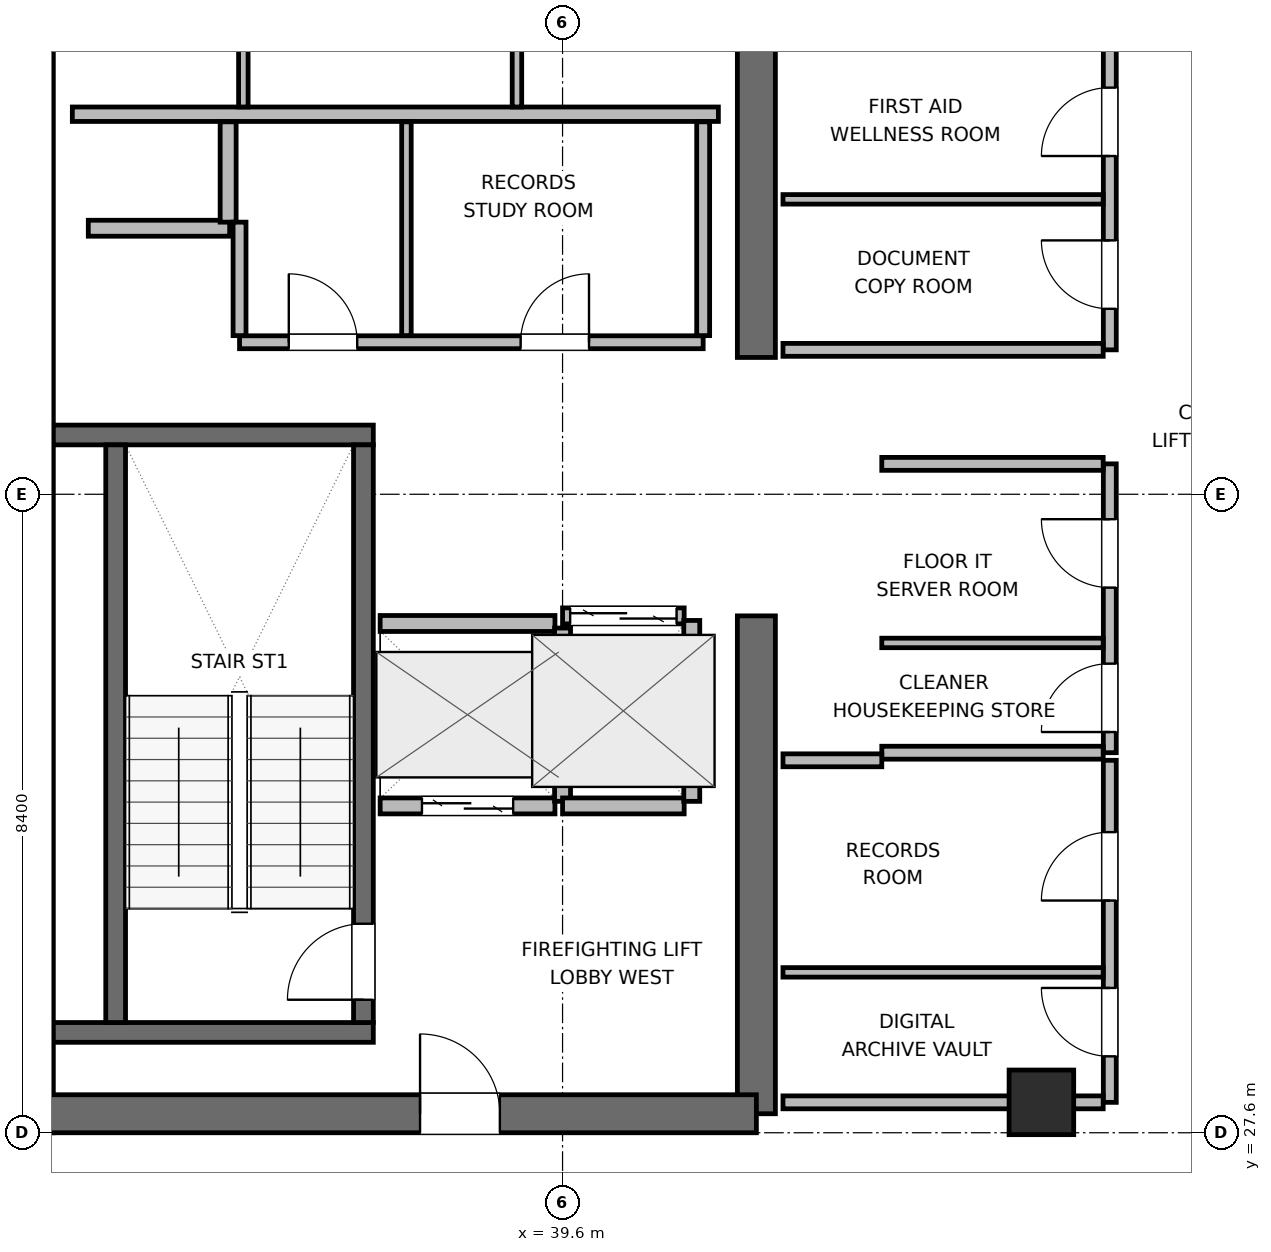
"""IFC4 building model, lengths in metres.
Left out: names, types, materials, properties, quantities, classifications, styles, units other than length and angle.
Written with IfcOpenShell. Run it as: python <this file> out.ifc"""

import sys

from ifc_helpers import new_model, si_unit, direction, frame, frame_2d, origin, origin_2d, place, context, subcontext, project, spatial, rectangle, extrude, element, fill, save


model = new_model("IFC4")
c1 = context("Model", 3, precision=1e-05, world=origin(), true_north=direction((0.0, 1.0)))
c2 = subcontext(c1, "Body", "Model", "MODEL_VIEW")
j1 = project(units=[si_unit("LENGTHUNIT", "METRE"), si_unit("PLANEANGLEUNIT", "RADIAN")], contexts=[c1])
p1 = place(None, origin())
s1 = spatial("IfcSite", under=j1, at=p1, CompositionType="ELEMENT")
p2 = place(p1, origin())
s2 = spatial("IfcBuilding", under=s1, at=p2, CompositionType="ELEMENT")
p3 = place(p2, frame((0.0, 0.0, 278.4)))
s3 = spatial("IfcBuildingStorey", under=s2, at=p3, CompositionType="ELEMENT", Elevation=278.4)
p4 = place(p3, frame((32.65, 27.6, 0.0), z_axis=(0.0, 0.0, 1.0), x_axis=(0.0, 1.0, 0.0)))
e1 = element("IfcWall", 1, at=p4, inside=s3, PredefinedType="SHEAR", context=c2, shape_type="SweptSolid", body=[
    extrude(rectangle(XDim=16.8, YDim=0.5, at=frame_2d((8.4, 0.0))), origin(), (0.0, 0.0, 1.0), 3.9),
])
p5 = place(p3, frame((42.15, 27.85, 0.0), z_axis=(0.0, 0.0, 1.0), x_axis=(0.0, 1.0, 0.0)))
e2 = element("IfcWall", 2, at=p5, inside=s3, PredefinedType="SHEAR", context=c2, shape_type="SweptSolid", body=[
    extrude(rectangle(XDim=6.55, YDim=0.5, at=frame_2d((3.275, 0.0))), origin(), (0.0, 0.0, 1.0), 3.9),
])
p6 = place(p3, frame((42.15, 37.8, 0.0), z_axis=(0.0, 0.0, 1.0), x_axis=(0.0, 1.0, 0.0)))
e3 = element("IfcWall", 3, at=p6, inside=s3, PredefinedType="SHEAR", context=c2, shape_type="SweptSolid", body=[
    extrude(rectangle(XDim=6.35, YDim=0.5, at=frame_2d((3.175, 0.0))), origin(), (0.0, 0.0, 1.0), 3.9),
])
p7 = place(p3, frame((32.65, 27.85, 0.0), z_axis=(0.0, 0.0, 1.0), x_axis=(1.0, 0.0, 0.0)))
e4 = element("IfcWall", 4, at=p7, inside=s3, PredefinedType="SHEAR", context=c2, shape_type="SweptSolid", body=[
    extrude(rectangle(XDim=9.5, YDim=0.5, at=frame_2d((4.75, 0.0))), origin(), (0.0, 0.0, 1.0), 3.9),
])
p8 = place(p7, frame((5.075, 0.0, 0.0)))
e5 = element("IfcOpeningElement", 5, at=p8, cuts=e4, PredefinedType="OPENING", context=c2, shape_type="SweptSolid", body=[
    extrude(rectangle(XDim=1.05, YDim=2.04, at=frame_2d((0.525, 1.02))), frame((0.0, 0.26, 0.0), z_axis=(0.0, -1.0, 0.0), x_axis=(1.0, 0.0, 0.0)), (0.0, 0.0, 1.0), 0.52),
])
for number, where, z_axis, x_axis in (
    (6, (32.9, 28.92, 0.0), (0.0, 0.0, 1.0), (1.0, 0.0, 0.0)),
    (7, (32.9, 36.78, 0.0), (0.0, 0.0, 1.0), (1.0, 0.0, 0.0)),
):
    element("IfcWall", number, at=place(p3, frame(where, z_axis=z_axis, x_axis=x_axis)), inside=s3, PredefinedType="SHEAR", context=c2, shape_type="SweptSolid", body=[
        extrude(rectangle(XDim=4.21, YDim=0.26, at=frame_2d((2.105, 0.0))), origin(), (0.0, 0.0, 1.0), 3.9),
    ])
p9 = place(p3, frame((33.72, 29.05, 0.0), z_axis=(0.0, 0.0, 1.0), x_axis=(0.0, 1.0, 0.0)))
e8 = element("IfcWall", 8, at=p9, inside=s3, PredefinedType="SHEAR", context=c2, shape_type="SweptSolid", body=[
    extrude(rectangle(XDim=7.6, YDim=0.26, at=frame_2d((3.8, 0.0))), origin(), (0.0, 0.0, 1.0), 3.9),
])
p10 = place(p3, frame((36.98, 29.05, 0.0), z_axis=(0.0, 0.0, 1.0), x_axis=(0.0, 1.0, 0.0)))
e9 = element("IfcWall", 9, at=p10, inside=s3, PredefinedType="SHEAR", context=c2, shape_type="SweptSolid", body=[
    extrude(rectangle(XDim=7.6, YDim=0.26, at=frame_2d((3.8, 0.0))), origin(), (0.0, 0.0, 1.0), 3.9),
])
p11 = place(p10, frame((0.3, 0.0, 0.0)))
e10 = element("IfcOpeningElement", 10, at=p11, cuts=e9, PredefinedType="OPENING", context=c2, shape_type="SweptSolid", body=[
    extrude(rectangle(XDim=1.0, YDim=2.04, at=frame_2d((0.5, 1.02))), frame((0.0, 0.14, 0.0), z_axis=(0.0, -1.0, 0.0), x_axis=(1.0, 0.0, 0.0)), (0.0, 0.0, 1.0), 0.28),
])
p12 = place(p3, frame((45.9, 28.0, 0.0), z_axis=(0.0, 0.0, 1.0), x_axis=(1.0, 0.0, 0.0)))
e11 = element("IfcColumn", 11, at=p12, inside=s3, PredefinedType="COLUMN", context=c2, shape_type="SweptSolid", body=[
    extrude(rectangle(XDim=0.85, YDim=0.85, at=origin_2d()), origin(), (0.0, 0.0, 1.0), 3.9),
])
p13 = place(p3, frame((33.15, 41.0, 0.0), z_axis=(0.0, 0.0, 1.0), x_axis=(1.0, 0.0, 0.0)))
e12 = element("IfcWall", 12, at=p13, inside=s3, PredefinedType="PLUMBINGWALL", context=c2, shape_type="SweptSolid", body=[
    extrude(rectangle(XDim=8.5, YDim=0.19, at=frame_2d((4.25, 0.0))), origin(), (0.0, 0.0, 1.0), 3.6),
])
for number, where, z_axis, x_axis in (
    (13, (35.4, 41.095, 0.0), (0.0, 0.0, 1.0), (0.0, 1.0, 0.0)),
    (14, (39.0, 41.095, 0.0), (0.0, 0.0, 1.0), (0.0, 1.0, 0.0)),
):
    element("IfcWall", number, at=place(p3, frame(where, z_axis=z_axis, x_axis=x_axis)), inside=s3, PredefinedType="PARTITIONING", context=c2, shape_type="SweptSolid", body=[
        extrude(rectangle(XDim=2.555, YDim=0.125, at=frame_2d((1.277, 0.0))), origin(), (0.0, 0.0, 1.0), 3.6),
    ])
p14 = place(p3, frame((33.36, 39.5, 0.0), z_axis=(0.0, 0.0, 1.0), x_axis=(1.0, 0.0, 0.0)))
e15 = element("IfcWall", 15, at=p14, inside=s3, PredefinedType="PARTITIONING", context=c2, shape_type="SweptSolid", body=[
    extrude(rectangle(XDim=1.86, YDim=0.21, at=frame_2d((0.93, 0.0))), origin(), (0.0, 0.0, 1.0), 3.6),
])
p15 = place(p3, frame((35.2, 39.58, 0.0), z_axis=(0.0, 0.0, 1.0), x_axis=(0.0, 1.0, 0.0)))
e16 = element("IfcWall", 16, at=p15, inside=s3, PredefinedType="PARTITIONING", context=c2, shape_type="SweptSolid", body=[
    extrude(rectangle(XDim=1.32, YDim=0.21, at=frame_2d((0.66, 0.0))), origin(), (0.0, 0.0, 1.0), 3.6),
])
p16 = place(p3, frame((37.2, 31.9, 0.0), z_axis=(0.0, 0.0, 1.0), x_axis=(1.0, 0.0, 0.0)))
e17 = element("IfcWall", 17, at=p16, inside=s3, PredefinedType="PARTITIONING", context=c2, shape_type="SweptSolid", body=[
    extrude(rectangle(XDim=2.3, YDim=0.21, at=frame_2d((1.15, 0.0))), origin(), (0.0, 0.0, 1.0), 3.6),
])
p17 = place(p16, frame((0.55, 0.0, 0.0)))
e18 = element("IfcOpeningElement", 18, at=p17, cuts=e17, PredefinedType="OPENING", context=c2, shape_type="SweptSolid", body=[
    extrude(rectangle(XDim=1.2, YDim=2.04, at=frame_2d((0.6, 1.02))), frame((0.0, 0.115, 0.0), z_axis=(0.0, -1.0, 0.0), x_axis=(1.0, 0.0, 0.0)), (0.0, 0.0, 1.0), 0.23),
])
p18 = place(p3, frame((37.2, 34.3, 0.0), z_axis=(0.0, 0.0, 1.0), x_axis=(1.0, 0.0, 0.0)))
e19 = element("IfcWall", 19, at=p18, inside=s3, PredefinedType="PARTITIONING", context=c2, shape_type="SweptSolid", body=[
    extrude(rectangle(XDim=2.3, YDim=0.21, at=frame_2d((1.15, 0.0))), origin(), (0.0, 0.0, 1.0), 3.6),
])
p19 = place(p3, frame((39.6, 31.96, 0.0), z_axis=(0.0, 0.0, 1.0), x_axis=(0.0, 1.0, 0.0)))
e20 = element("IfcWall", 20, at=p19, inside=s3, PredefinedType="PARTITIONING", context=c2, shape_type="SweptSolid", body=[
    extrude(rectangle(XDim=2.28, YDim=0.21, at=frame_2d((1.14, 0.0))), origin(), (0.0, 0.0, 1.0), 3.6),
])
p20 = place(p3, frame((39.6, 34.4, 0.0), z_axis=(0.0, 0.0, 1.0), x_axis=(1.0, 0.0, 0.0)))
e21 = element("IfcWall", 21, at=p20, inside=s3, PredefinedType="PARTITIONING", context=c2, shape_type="SweptSolid", body=[
    extrude(rectangle(XDim=1.6, YDim=0.21, at=frame_2d((0.8, 0.0))), origin(), (0.0, 0.0, 1.0), 3.6),
])
p21 = place(p20, frame((0.1, 0.0, 0.0)))
e22 = element("IfcOpeningElement", 22, at=p21, cuts=e21, PredefinedType="OPENING", context=c2, shape_type="SweptSolid", body=[
    extrude(rectangle(XDim=1.4, YDim=2.06, at=frame_2d((0.7, 1.03))), frame((0.0, 0.115, 0.0), z_axis=(0.0, -1.0, 0.0), x_axis=(1.0, 0.0, 0.0)), (0.0, 0.0, 1.0), 0.23),
])
p22 = place(p3, frame((39.6, 31.9, 0.0), z_axis=(0.0, 0.0, 1.0), x_axis=(1.0, 0.0, 0.0)))
e23 = element("IfcWall", 23, at=p22, inside=s3, PredefinedType="PARTITIONING", context=c2, shape_type="SweptSolid", body=[
    extrude(rectangle(XDim=1.6, YDim=0.21, at=frame_2d((0.8, 0.0))), origin(), (0.0, 0.0, 1.0), 3.6),
])
p23 = place(p3, frame((41.3, 31.96, 0.0), z_axis=(0.0, 0.0, 1.0), x_axis=(0.0, 1.0, 0.0)))
e24 = element("IfcWall", 24, at=p23, inside=s3, PredefinedType="PARTITIONING", context=c2, shape_type="SweptSolid", body=[
    extrude(rectangle(XDim=2.38, YDim=0.21, at=frame_2d((1.19, 0.0))), origin(), (0.0, 0.0, 1.0), 3.6),
])
p24 = place(p3, frame((35.35, 38.0, 0.0), z_axis=(0.0, 0.0, 1.0), x_axis=(1.0, 0.0, 0.0)))
e25 = element("IfcWall", 25, at=p24, inside=s3, PredefinedType="PARTITIONING", context=c2, shape_type="SweptSolid", body=[
    extrude(rectangle(XDim=6.1, YDim=0.17, at=frame_2d((3.05, 0.0))), origin(), (0.0, 0.0, 1.0), 3.6),
])
p25 = place(p24, frame((0.648, 0.0, 0.0)))
e26 = element("IfcOpeningElement", 26, at=p25, cuts=e25, PredefinedType="OPENING", context=c2, shape_type="SweptSolid", body=[
    extrude(rectangle(XDim=0.9, YDim=2.02, at=frame_2d((0.45, 1.01))), frame((0.0, 0.095, 0.0), z_axis=(0.0, -1.0, 0.0), x_axis=(1.0, 0.0, 0.0)), (0.0, 0.0, 1.0), 0.19),
])
p26 = place(p24, frame((3.698, 0.0, 0.0)))
e27 = element("IfcOpeningElement", 27, at=p26, cuts=e25, PredefinedType="OPENING", context=c2, shape_type="SweptSolid", body=[
    extrude(rectangle(XDim=0.9, YDim=2.02, at=frame_2d((0.45, 1.01))), frame((0.0, 0.095, 0.0), z_axis=(0.0, -1.0, 0.0), x_axis=(1.0, 0.0, 0.0)), (0.0, 0.0, 1.0), 0.19),
])
p27 = place(p3, frame((35.35, 38.087, 0.0), z_axis=(0.0, 0.0, 1.0), x_axis=(0.0, 1.0, 0.0)))
e28 = element("IfcWall", 28, at=p27, inside=s3, PredefinedType="PARTITIONING", context=c2, shape_type="SweptSolid", body=[
    extrude(rectangle(XDim=1.493, YDim=0.17, at=frame_2d((0.747, 0.0))), origin(), (0.0, 0.0, 1.0), 3.6),
])
p28 = place(p3, frame((41.45, 38.087, 0.0), z_axis=(0.0, 0.0, 1.0), x_axis=(0.0, 1.0, 0.0)))
e29 = element("IfcWall", 29, at=p28, inside=s3, PredefinedType="PARTITIONING", context=c2, shape_type="SweptSolid", body=[
    extrude(rectangle(XDim=2.813, YDim=0.17, at=frame_2d((1.406, 0.0))), origin(), (0.0, 0.0, 1.0), 3.6),
])
p29 = place(p3, frame((37.546, 38.087, 0.0), z_axis=(0.0, 0.0, 1.0), x_axis=(0.0, 1.0, 0.0)))
e30 = element("IfcWall", 30, at=p29, inside=s3, PredefinedType="PARTITIONING", context=c2, shape_type="SweptSolid", body=[
    extrude(rectangle(XDim=2.813, YDim=0.125, at=frame_2d((1.406, 0.0))), origin(), (0.0, 0.0, 1.0), 3.6),
])
p30 = place(p3, frame((46.8, 32.6, 0.0), z_axis=(0.0, 0.0, 1.0), x_axis=(0.0, 1.0, 0.0)))
e31 = element("IfcWall", 31, at=p30, inside=s3, PredefinedType="PARTITIONING", context=c2, shape_type="SweptSolid", body=[
    extrude(rectangle(XDim=3.8, YDim=0.17, at=frame_2d((1.9, 0.0))), origin(), (0.0, 0.0, 1.0), 3.6),
])
p31 = place(p30, frame((0.272, 0.0, 0.0)))
e32 = element("IfcOpeningElement", 32, at=p31, cuts=e31, PredefinedType="OPENING", context=c2, shape_type="SweptSolid", body=[
    extrude(rectangle(XDim=0.9, YDim=2.02, at=frame_2d((0.45, 1.01))), frame((0.0, 0.095, 0.0), z_axis=(0.0, -1.0, 0.0), x_axis=(1.0, 0.0, 0.0)), (0.0, 0.0, 1.0), 0.19),
])
p32 = place(p30, frame((2.172, 0.0, 0.0)))
e33 = element("IfcOpeningElement", 33, at=p32, cuts=e31, PredefinedType="OPENING", context=c2, shape_type="SweptSolid", body=[
    extrude(rectangle(XDim=0.9, YDim=2.02, at=frame_2d((0.45, 1.01))), frame((0.0, 0.095, 0.0), z_axis=(0.0, -1.0, 0.0), x_axis=(1.0, 0.0, 0.0)), (0.0, 0.0, 1.0), 0.19),
])
for number, where, z_axis, x_axis in (
    (34, (43.8, 32.6, 0.0), (0.0, 0.0, 1.0), (1.0, 0.0, 0.0)),
    (35, (43.8, 36.4, 0.0), (0.0, 0.0, 1.0), (1.0, 0.0, 0.0)),
):
    element("IfcWall", number, at=place(p3, frame(where, z_axis=z_axis, x_axis=x_axis)), inside=s3, PredefinedType="PARTITIONING", context=c2, shape_type="SweptSolid", body=[
        extrude(rectangle(XDim=2.913, YDim=0.17, at=frame_2d((1.457, 0.0))), origin(), (0.0, 0.0, 1.0), 3.6),
    ])
p33 = place(p3, frame((43.8, 34.044, 0.0), z_axis=(0.0, 0.0, 1.0), x_axis=(1.0, 0.0, 0.0)))
e36 = element("IfcWall", 36, at=p33, inside=s3, PredefinedType="PARTITIONING", context=c2, shape_type="SweptSolid", body=[
    extrude(rectangle(XDim=2.913, YDim=0.125, at=frame_2d((1.457, 0.0))), origin(), (0.0, 0.0, 1.0), 3.6),
])
p34 = place(p3, frame((46.8, 28.0, 0.0), z_axis=(0.0, 0.0, 1.0), x_axis=(0.0, 1.0, 0.0)))
e37 = element("IfcWall", 37, at=p34, inside=s3, PredefinedType="PARTITIONING", context=c2, shape_type="SweptSolid", body=[
    extrude(rectangle(XDim=4.5, YDim=0.17, at=frame_2d((2.25, 0.0))), origin(), (0.0, 0.0, 1.0), 3.6),
])
p35 = place(p34, frame((0.605, 0.0, 0.0)))
e38 = element("IfcOpeningElement", 38, at=p35, cuts=e37, PredefinedType="OPENING", context=c2, shape_type="SweptSolid", body=[
    extrude(rectangle(XDim=0.9, YDim=2.02, at=frame_2d((0.45, 1.01))), frame((0.0, 0.095, 0.0), z_axis=(0.0, -1.0, 0.0), x_axis=(1.0, 0.0, 0.0)), (0.0, 0.0, 1.0), 0.19),
])
p36 = place(p34, frame((2.655, 0.0, 0.0)))
e39 = element("IfcOpeningElement", 39, at=p36, cuts=e37, PredefinedType="OPENING", context=c2, shape_type="SweptSolid", body=[
    extrude(rectangle(XDim=0.9, YDim=2.02, at=frame_2d((0.45, 1.01))), frame((0.0, 0.095, 0.0), z_axis=(0.0, -1.0, 0.0), x_axis=(1.0, 0.0, 0.0)), (0.0, 0.0, 1.0), 0.19),
])
p37 = place(p3, frame((42.5, 28.0, 0.0), z_axis=(0.0, 0.0, 1.0), x_axis=(1.0, 0.0, 0.0)))
e40 = element("IfcWall", 40, at=p37, inside=s3, PredefinedType="PARTITIONING", context=c2, shape_type="SweptSolid", body=[
    extrude(rectangle(XDim=4.213, YDim=0.17, at=frame_2d((2.106, 0.0))), origin(), (0.0, 0.0, 1.0), 2.685),
])
p38 = place(p3, frame((42.5, 32.5, 0.0), z_axis=(0.0, 0.0, 1.0), x_axis=(1.0, 0.0, 0.0)))
e41 = element("IfcWall", 41, at=p38, inside=s3, PredefinedType="PARTITIONING", context=c2, shape_type="SweptSolid", body=[
    extrude(rectangle(XDim=1.3, YDim=0.17, at=frame_2d((0.65, 0.0))), origin(), (0.0, 0.0, 1.0), 3.6),
])
p39 = place(p3, frame((42.5, 29.71, 0.0), z_axis=(0.0, 0.0, 1.0), x_axis=(1.0, 0.0, 0.0)))
e42 = element("IfcWall", 42, at=p39, inside=s3, PredefinedType="PARTITIONING", context=c2, shape_type="SweptSolid", body=[
    extrude(rectangle(XDim=4.213, YDim=0.125, at=frame_2d((2.106, 0.0))), origin(), (0.0, 0.0, 1.0), 3.6),
])
p40 = place(p3, frame((46.8, 37.9, 0.0), z_axis=(0.0, 0.0, 1.0), x_axis=(0.0, 1.0, 0.0)))
e43 = element("IfcWall", 43, at=p40, inside=s3, PredefinedType="PARTITIONING", context=c2, shape_type="SweptSolid", body=[
    extrude(rectangle(XDim=6.0, YDim=0.17, at=frame_2d((3.0, 0.0))), origin(), (0.0, 0.0, 1.0), 3.6),
])
p41 = place(p40, frame((0.54, 0.0, 0.0)))
e44 = element("IfcOpeningElement", 44, at=p41, cuts=e43, PredefinedType="OPENING", context=c2, shape_type="SweptSolid", body=[
    extrude(rectangle(XDim=0.9, YDim=2.02, at=frame_2d((0.45, 1.01))), frame((0.0, 0.095, 0.0), z_axis=(0.0, -1.0, 0.0), x_axis=(1.0, 0.0, 0.0)), (0.0, 0.0, 1.0), 0.19),
])
p42 = place(p40, frame((2.55, 0.0, 0.0)))
e45 = element("IfcOpeningElement", 45, at=p42, cuts=e43, PredefinedType="OPENING", context=c2, shape_type="SweptSolid", body=[
    extrude(rectangle(XDim=0.9, YDim=2.02, at=frame_2d((0.45, 1.01))), frame((0.0, 0.095, 0.0), z_axis=(0.0, -1.0, 0.0), x_axis=(1.0, 0.0, 0.0)), (0.0, 0.0, 1.0), 0.19),
])
p43 = place(p40, frame((4.56, 0.0, 0.0)))
e46 = element("IfcOpeningElement", 46, at=p43, cuts=e43, PredefinedType="OPENING", context=c2, shape_type="SweptSolid", body=[
    extrude(rectangle(XDim=0.9, YDim=2.02, at=frame_2d((0.45, 1.01))), frame((0.0, 0.095, 0.0), z_axis=(0.0, -1.0, 0.0), x_axis=(1.0, 0.0, 0.0)), (0.0, 0.0, 1.0), 0.19),
])
p44 = place(p3, frame((42.5, 37.9, 0.0), z_axis=(0.0, 0.0, 1.0), x_axis=(1.0, 0.0, 0.0)))
e47 = element("IfcWall", 47, at=p44, inside=s3, PredefinedType="PARTITIONING", context=c2, shape_type="SweptSolid", body=[
    extrude(rectangle(XDim=4.213, YDim=0.17, at=frame_2d((2.106, 0.0))), origin(), (0.0, 0.0, 1.0), 3.6),
])
p45 = place(p3, frame((42.5, 39.88, 0.0), z_axis=(0.0, 0.0, 1.0), x_axis=(1.0, 0.0, 0.0)))
e48 = element("IfcWall", 48, at=p45, inside=s3, PredefinedType="PARTITIONING", context=c2, shape_type="SweptSolid", body=[
    extrude(rectangle(XDim=4.213, YDim=0.125, at=frame_2d((2.106, 0.0))), origin(), (0.0, 0.0, 1.0), 3.6),
])
p46 = place(p11, origin())
e49 = element("IfcDoor", 49, at=p46, inside=s3, OperationType="SINGLE_SWING_LEFT", PredefinedType="DOOR", context=c2, shape_type="SweptSolid", body=[
    extrude(rectangle(XDim=1.0, YDim=2.04, at=frame_2d((0.5, 1.02))), frame((0.0, 0.025, 0.0), z_axis=(0.0, -1.0, 0.0), x_axis=(1.0, 0.0, 0.0)), (0.0, 0.0, 1.0), 0.05),
])
fill(e10, e49)
p47 = place(p17, origin())
e50 = element("IfcDoor", 50, at=p47, inside=s3, OperationType="DOUBLE_DOOR_SLIDING", PredefinedType="DOOR", context=c2, shape_type="SweptSolid", body=[
    extrude(rectangle(XDim=1.2, YDim=2.04, at=frame_2d((0.6, 1.02))), frame((0.0, 0.025, 0.0), z_axis=(0.0, -1.0, 0.0), x_axis=(1.0, 0.0, 0.0)), (0.0, 0.0, 1.0), 0.05),
])
fill(e18, e50)
p48 = place(p21, origin())
e51 = element("IfcDoor", 51, at=p48, inside=s3, OperationType="DOUBLE_DOOR_SLIDING", PredefinedType="DOOR", context=c2, shape_type="SweptSolid", body=[
    extrude(rectangle(XDim=1.4, YDim=2.06, at=frame_2d((0.7, 1.03))), frame((0.0, 0.025, 0.0), z_axis=(0.0, -1.0, 0.0), x_axis=(1.0, 0.0, 0.0)), (0.0, 0.0, 1.0), 0.05),
])
fill(e22, e51)
p49 = place(p8, origin())
e52 = element("IfcDoor", 52, at=p49, inside=s3, OperationType="SINGLE_SWING_LEFT", PredefinedType="DOOR", context=c2, shape_type="SweptSolid", body=[
    extrude(rectangle(XDim=1.05, YDim=2.04, at=frame_2d((0.525, 1.02))), frame((0.0, 0.025, 0.0), z_axis=(0.0, -1.0, 0.0), x_axis=(1.0, 0.0, 0.0)), (0.0, 0.0, 1.0), 0.05),
])
fill(e5, e52)
p50 = place(p25, origin())
e53 = element("IfcDoor", 53, at=p50, inside=s3, OperationType="SINGLE_SWING_LEFT", PredefinedType="DOOR", context=c2, shape_type="SweptSolid", body=[
    extrude(rectangle(XDim=0.9, YDim=2.02, at=frame_2d((0.45, 1.01))), frame((0.0, 0.025, 0.0), z_axis=(0.0, -1.0, 0.0), x_axis=(1.0, 0.0, 0.0)), (0.0, 0.0, 1.0), 0.05),
])
fill(e26, e53)
p51 = place(p26, origin())
e54 = element("IfcDoor", 54, at=p51, inside=s3, OperationType="SINGLE_SWING_RIGHT", PredefinedType="DOOR", context=c2, shape_type="SweptSolid", body=[
    extrude(rectangle(XDim=0.9, YDim=2.02, at=frame_2d((0.45, 1.01))), frame((0.0, 0.025, 0.0), z_axis=(0.0, -1.0, 0.0), x_axis=(1.0, 0.0, 0.0)), (0.0, 0.0, 1.0), 0.05),
])
fill(e27, e54)
p52 = place(p31, origin())
e55 = element("IfcDoor", 55, at=p52, inside=s3, OperationType="SINGLE_SWING_LEFT", PredefinedType="DOOR", context=c2, shape_type="SweptSolid", body=[
    extrude(rectangle(XDim=0.9, YDim=2.02, at=frame_2d((0.45, 1.01))), frame((0.0, 0.025, 0.0), z_axis=(0.0, -1.0, 0.0), x_axis=(1.0, 0.0, 0.0)), (0.0, 0.0, 1.0), 0.05),
])
fill(e32, e55)
p53 = place(p32, origin())
e56 = element("IfcDoor", 56, at=p53, inside=s3, OperationType="SINGLE_SWING_RIGHT", PredefinedType="DOOR", context=c2, shape_type="SweptSolid", body=[
    extrude(rectangle(XDim=0.9, YDim=2.02, at=frame_2d((0.45, 1.01))), frame((0.0, 0.025, 0.0), z_axis=(0.0, -1.0, 0.0), x_axis=(1.0, 0.0, 0.0)), (0.0, 0.0, 1.0), 0.05),
])
fill(e33, e56)
p54 = place(p35, origin())
e57 = element("IfcDoor", 57, at=p54, inside=s3, OperationType="SINGLE_SWING_RIGHT", PredefinedType="DOOR", context=c2, shape_type="SweptSolid", body=[
    extrude(rectangle(XDim=0.9, YDim=2.02, at=frame_2d((0.45, 1.01))), frame((0.0, 0.025, 0.0), z_axis=(0.0, -1.0, 0.0), x_axis=(1.0, 0.0, 0.0)), (0.0, 0.0, 1.0), 0.05),
])
fill(e38, e57)
p55 = place(p36, origin())
e58 = element("IfcDoor", 58, at=p55, inside=s3, OperationType="SINGLE_SWING_LEFT", PredefinedType="DOOR", context=c2, shape_type="SweptSolid", body=[
    extrude(rectangle(XDim=0.9, YDim=2.02, at=frame_2d((0.45, 1.01))), frame((0.0, 0.025, 0.0), z_axis=(0.0, -1.0, 0.0), x_axis=(1.0, 0.0, 0.0)), (0.0, 0.0, 1.0), 0.05),
])
fill(e39, e58)
p56 = place(p41, origin())
e59 = element("IfcDoor", 59, at=p56, inside=s3, OperationType="SINGLE_SWING_RIGHT", PredefinedType="DOOR", context=c2, shape_type="SweptSolid", body=[
    extrude(rectangle(XDim=0.9, YDim=2.02, at=frame_2d((0.45, 1.01))), frame((0.0, 0.025, 0.0), z_axis=(0.0, -1.0, 0.0), x_axis=(1.0, 0.0, 0.0)), (0.0, 0.0, 1.0), 0.05),
])
fill(e44, e59)
p57 = place(p42, origin())
e60 = element("IfcDoor", 60, at=p57, inside=s3, OperationType="SINGLE_SWING_LEFT", PredefinedType="DOOR", context=c2, shape_type="SweptSolid", body=[
    extrude(rectangle(XDim=0.9, YDim=2.02, at=frame_2d((0.45, 1.01))), frame((0.0, 0.025, 0.0), z_axis=(0.0, -1.0, 0.0), x_axis=(1.0, 0.0, 0.0)), (0.0, 0.0, 1.0), 0.05),
])
fill(e45, e60)
save(model, sys.argv[1])
